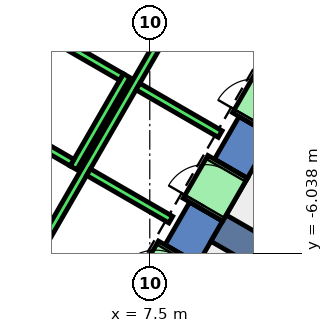
"""IFC4 building model, lengths in metres.
Left out: names, types, materials, properties, quantities, classifications, styles, units other than length and angle.
Written with IfcOpenShell. Run it as: python <this file> out.ifc"""

import sys

from ifc_helpers import new_model, si_unit, direction, frame, frame_2d, origin, place, context, subcontext, project, spatial, polyline, rectangle, outline, extrude, element, fill, save


model = new_model("IFC4")
c1 = context("Model", 3, precision=1e-05, world=origin(), true_north=direction((0.0, 1.0)))
c2 = subcontext(c1, "Body", "Model", "MODEL_VIEW")
j1 = project(units=[si_unit("LENGTHUNIT", "METRE"), si_unit("PLANEANGLEUNIT", "RADIAN")], contexts=[c1])
p1 = place(None, origin())
s1 = spatial("IfcSite", under=j1, at=p1, CompositionType="ELEMENT")
p2 = place(p1, origin())
s2 = spatial("IfcBuilding", under=s1, at=p2, CompositionType="ELEMENT")
p3 = place(p2, frame((0.0, 0.0, 176.0)))
s3 = spatial("IfcBuildingStorey", under=s2, at=p3, CompositionType="ELEMENT", Elevation=176.0)
p4 = place(p3, frame((0.0, 0.0, -0.4)))
e1 = element("IfcWall", 1, at=p4, inside=s3, PredefinedType="SHEAR", context=c2, shape_type="SweptSolid", body=[
    extrude(outline(polyline([(9.417, -5.189), (8.551, -4.689), (7.902, -5.814), (8.767, -6.314), (9.417, -5.189)])), origin(), (0.0, 0.0, 1.0), 4.2),
])
p5 = place(p3, frame((0.0, 0.0, -0.4)))
e2 = element("IfcWall", 2, at=p5, inside=s3, PredefinedType="SHEAR", context=c2, shape_type="SweptSolid", body=[
    extrude(outline(polyline([(10.717, -2.937), (9.851, -2.437), (9.201, -3.563), (10.067, -4.063), (10.717, -2.937)])), origin(), (0.0, 0.0, 1.0), 4.2),
])
p6 = place(p3, frame((0.0, 0.0, 3.6)))
e3 = element("IfcWall", 3, at=p6, inside=s3, PredefinedType="SHEAR", context=c2, shape_type="SweptSolid", body=[
    extrude(outline(polyline([(8.767, -6.314), (7.902, -5.814), (7.252, -6.94), (8.117, -7.44), (8.767, -6.314)])), origin(), (0.0, 0.0, 1.0), 0.2),
])
p7 = place(p3, frame((0.0, 0.0, 3.6)))
e4 = element("IfcWall", 4, at=p7, inside=s3, PredefinedType="SHEAR", context=c2, shape_type="SweptSolid", body=[
    extrude(outline(polyline([(10.067, -4.063), (9.201, -3.563), (8.551, -4.689), (9.417, -5.189), (10.067, -4.063)])), origin(), (0.0, 0.0, 1.0), 0.2),
])
p8 = place(p3, frame((0.0, 0.0, 3.6)))
e5 = element("IfcWall", 5, at=p8, inside=s3, PredefinedType="SHEAR", context=c2, shape_type="SweptSolid", body=[
    extrude(outline(polyline([(11.367, -1.811), (10.501, -1.311), (9.851, -2.437), (10.717, -2.937), (11.367, -1.811)])), origin(), (0.0, 0.0, 1.0), 0.2),
])
p9 = place(p3, frame((9.31, -5.375, -0.4), z_axis=(0.0, 0.0, 1.0), x_axis=(0.866017533419, -0.500013631625, 0.0)))
e6 = element("IfcWall", 6, at=p9, inside=s3, PredefinedType="SHEAR", context=c2, shape_type="SweptSolid", body=[
    extrude(rectangle(XDim=9.0, YDim=0.8, at=frame_2d((4.5, 0.0))), origin(), (0.0, 0.0, 1.0), 4.2),
])
p10 = place(p3, frame((5.492, -3.788, 0.0), z_axis=(0.0, 0.0, 1.0), x_axis=(0.500011755427, 0.866018616679, 0.0)))
e7 = element("IfcWall", 7, at=p10, inside=s3, PredefinedType="STANDARD", context=c2, shape_type="SweptSolid", body=[
    extrude(rectangle(XDim=2.8, YDim=0.2, at=frame_2d((1.4, 0.0))), origin(), (0.0, 0.0, 1.0), 3.75),
])
p11 = place(p3, frame((3.377, -2.452, 0.0), z_axis=(0.0, 0.0, 1.0), x_axis=(0.865955154139, -0.50012165622, 0.0)))
e8 = element("IfcWall", 8, at=p11, inside=s3, PredefinedType="STANDARD", context=c2, shape_type="SweptSolid", body=[
    extrude(rectangle(XDim=2.4, YDim=0.2, at=frame_2d((1.2, 0.0))), origin(), (0.0, 0.0, 1.0), 3.75),
])
p12 = place(p3, frame((4.677, -0.2, 0.0), z_axis=(0.0, 0.0, 1.0), x_axis=(0.865973769406, -0.500089422704, 0.0)))
e9 = element("IfcWall", 9, at=p12, inside=s3, PredefinedType="STANDARD", context=c2, shape_type="SweptSolid", body=[
    extrude(rectangle(XDim=2.399, YDim=0.2, at=frame_2d((1.2, 0.0))), origin(), (0.0, 0.0, 1.0), 3.75),
])
p13 = place(p3, frame((4.451, -6.19, 0.0), z_axis=(0.0, 0.0, 1.0), x_axis=(0.50000090737, 0.866024879913, 0.0)))
e10 = element("IfcWall", 10, at=p13, inside=s3, PredefinedType="STANDARD", context=c2, shape_type="SweptSolid", body=[
    extrude(rectangle(XDim=10.6, YDim=0.2, at=frame_2d((5.3, 0.0))), origin(), (0.0, 0.0, 1.0), 3.75),
])
for number, where, z_axis, x_axis in (
    (11, (5.888, -3.902, 0.0), (0.0, 0.0, 1.0), (0.866, -0.5, 0.0)),
    (12, (7.188, -1.65, 0.0), (0.0, 0.0, 1.0), (0.866, -0.5, 0.0)),
):
    element("IfcWall", number, at=place(p3, frame(where, z_axis=z_axis, x_axis=x_axis)), inside=s3, PredefinedType="STANDARD", context=c2, shape_type="SweptSolid", body=[
        extrude(rectangle(XDim=2.5, YDim=0.2, at=frame_2d((1.25, 0.0))), origin(), (0.0, 0.0, 1.0), 3.75),
    ])
p14 = place(p3, frame((7.598, -7.14, 0.0), z_axis=(0.0, 0.0, 1.0), x_axis=(0.500362116554, 0.865816234728, 0.0)))
e13 = element("IfcWall", 13, at=p14, inside=s3, PredefinedType="STANDARD", context=c2, shape_type="SweptSolid", body=[
    extrude(rectangle(XDim=1.299, YDim=1.2, at=frame_2d((0.65, 0.0))), origin(), (0.0, 0.0, 1.0), 2.4),
])
p15 = place(p14, frame((0.1, 0.0, 0.0)))
e14 = element("IfcOpeningElement", 14, at=p15, cuts=e13, PredefinedType="OPENING", context=c2, shape_type="SweptSolid", body=[
    extrude(rectangle(XDim=1.1, YDim=2.3, at=frame_2d((0.55, 1.15))), frame((0.0, 0.61, 0.0), z_axis=(0.0, -1.0, 0.0), x_axis=(1.0, 0.0, 0.0)), (0.0, 0.0, 1.0), 1.22),
])
p16 = place(p3, frame((8.898, -4.889, 0.0), z_axis=(0.0, 0.0, 1.0), x_axis=(0.500036693733, 0.866004217611, 0.0)))
e15 = element("IfcWall", 15, at=p16, inside=s3, PredefinedType="STANDARD", context=c2, shape_type="SweptSolid", body=[
    extrude(rectangle(XDim=1.3, YDim=1.2, at=frame_2d((0.65, 0.0))), origin(), (0.0, 0.0, 1.0), 2.4),
])
p17 = place(p16, frame((0.1, 0.0, 0.0)))
e16 = element("IfcOpeningElement", 16, at=p17, cuts=e15, PredefinedType="OPENING", context=c2, shape_type="SweptSolid", body=[
    extrude(rectangle(XDim=1.1, YDim=2.3, at=frame_2d((0.55, 1.15))), frame((0.0, 0.61, 0.0), z_axis=(0.0, -1.0, 0.0), x_axis=(1.0, 0.0, 0.0)), (0.0, 0.0, 1.0), 1.22),
])
p18 = place(p3, frame((10.198, -2.637, 0.0), z_axis=(0.0, 0.0, 1.0), x_axis=(0.49989585183, 0.866085525409, 0.0)))
e17 = element("IfcWall", 17, at=p18, inside=s3, PredefinedType="STANDARD", context=c2, shape_type="SweptSolid", body=[
    extrude(rectangle(XDim=1.3, YDim=1.2, at=frame_2d((0.65, 0.0))), origin(), (0.0, 0.0, 1.0), 2.4),
])
p19 = place(p18, frame((0.1, 0.0, 0.0)))
e18 = element("IfcOpeningElement", 18, at=p19, cuts=e17, PredefinedType="OPENING", context=c2, shape_type="SweptSolid", body=[
    extrude(rectangle(XDim=1.1, YDim=2.3, at=frame_2d((0.55, 1.15))), frame((0.0, 0.61, 0.0), z_axis=(0.0, -1.0, 0.0), x_axis=(1.0, 0.0, 0.0)), (0.0, 0.0, 1.0), 1.22),
])
p20 = place(p17, origin())
e19 = element("IfcDoor", 19, at=p20, inside=s3, OperationType="SLIDING_TO_LEFT", PredefinedType="DOOR", context=c2, shape_type="SweptSolid", body=[
    extrude(rectangle(XDim=1.1, YDim=2.3, at=frame_2d((0.55, 1.15))), frame((0.0, 0.025, 0.0), z_axis=(0.0, -1.0, 0.0), x_axis=(1.0, 0.0, 0.0)), (0.0, 0.0, 1.0), 0.05),
])
fill(e16, e19)
save(model, sys.argv[1])
